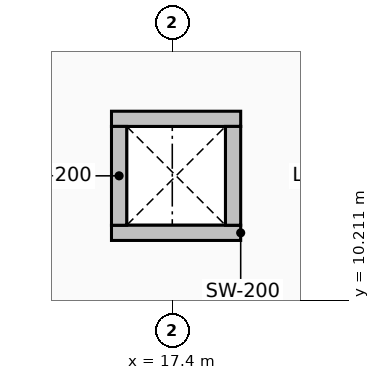
"""IFC4 building model, lengths in metres.
Left out: names, types, materials, properties, quantities, classifications, styles, units other than length and angle.
Written with IfcOpenShell. Run it as: python <this file> out.ifc"""

import sys

from ifc_helpers import new_model, si_unit, direction, frame, frame_2d, origin, place, context, subcontext, project, spatial, rectangle, extrude, element, save


model = new_model("IFC4")
c1 = context("Model", 3, precision=1e-05, world=origin(), true_north=direction((0.0, 1.0)))
c2 = subcontext(c1, "Body", "Model", "MODEL_VIEW")
j1 = project(units=[si_unit("LENGTHUNIT", "METRE"), si_unit("PLANEANGLEUNIT", "RADIAN")], contexts=[c1])
p1 = place(None, origin())
s1 = spatial("IfcSite", under=j1, at=p1, CompositionType="ELEMENT")
p2 = place(p1, origin())
s2 = spatial("IfcBuilding", under=s1, at=p2, CompositionType="ELEMENT")
p3 = place(p2, frame((0.0, 0.0, 5.4)))
s3 = spatial("IfcBuildingStorey", under=s2, at=p3, CompositionType="ELEMENT", Elevation=5.4)
for number, where, z_axis, x_axis in (
    (1, (16.6, 11.1, 0.0), (0.0, 0.0, 1.0), (1.0, 0.0, 0.0)),
    (2, (18.3, 12.6, 0.0), (0.0, 0.0, 1.0), (-1.0, 0.0, 0.0)),
):
    element("IfcWall", number, at=place(p3, frame(where, z_axis=z_axis, x_axis=x_axis)), inside=s3, PredefinedType="PARTITIONING", context=c2, shape_type="SweptSolid", body=[
        extrude(rectangle(XDim=1.7, YDim=0.2, at=frame_2d((0.85, 0.0))), origin(), (0.0, 0.0, 1.0), 4.5),
    ])
for number, where, z_axis, x_axis in (
    (3, (16.7, 11.2, 0.0), (0.0, 0.0, 1.0), (0.0, 1.0, 0.0)),
    (4, (18.2, 12.5, 0.0), (0.0, 0.0, 1.0), (0.0, -1.0, 0.0)),
):
    element("IfcWall", number, at=place(p3, frame(where, z_axis=z_axis, x_axis=x_axis)), inside=s3, PredefinedType="PARTITIONING", context=c2, shape_type="SweptSolid", body=[
        extrude(rectangle(XDim=1.3, YDim=0.2, at=frame_2d((0.65, 0.0))), origin(), (0.0, 0.0, 1.0), 4.5),
    ])
save(model, sys.argv[1])
